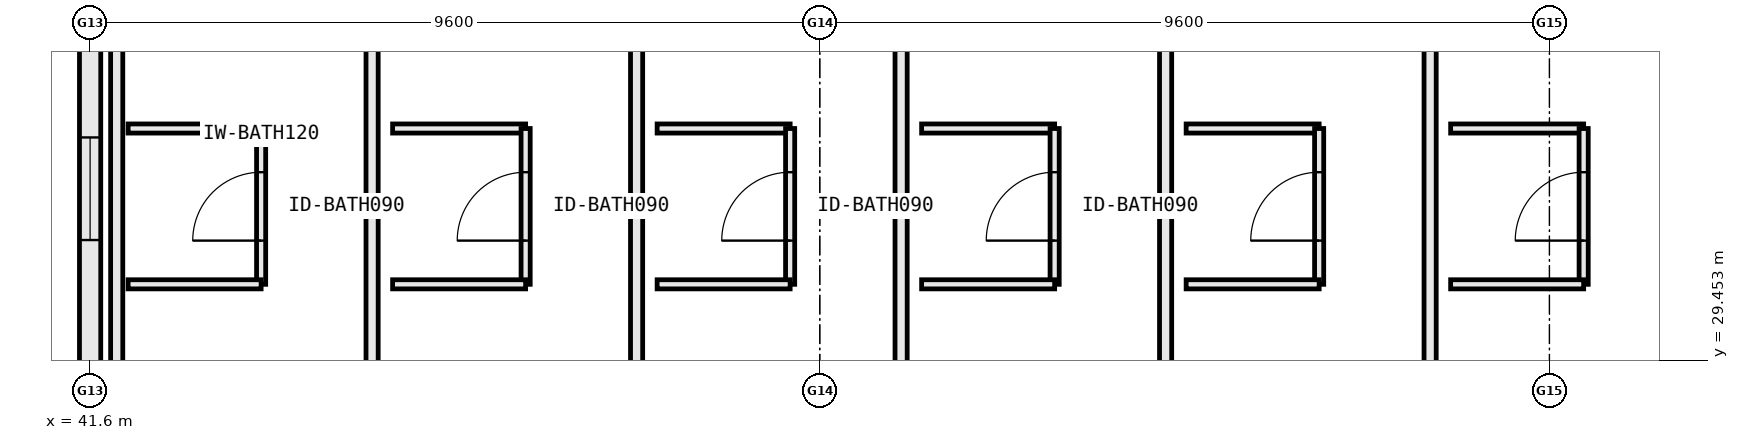
"""IFC4 building model, lengths in metres.
Left out: names, types, materials, properties, quantities, classifications, styles, units other than length and angle.
Written with IfcOpenShell. Run it as: python <this file> out.ifc"""

import sys

from ifc_helpers import new_model, si_unit, direction, frame, frame_2d, origin, place, context, subcontext, project, spatial, rectangle, extrude, element, fill, save


model = new_model("IFC4")
c1 = context("Model", 3, precision=1e-05, world=origin(), true_north=direction((0.0, 1.0)))
c2 = subcontext(c1, "Body", "Model", "MODEL_VIEW")
j1 = project(units=[si_unit("LENGTHUNIT", "METRE"), si_unit("PLANEANGLEUNIT", "RADIAN")], contexts=[c1])
p1 = place(None, origin())
s1 = spatial("IfcSite", under=j1, at=p1, CompositionType="ELEMENT")
p2 = place(p1, origin())
s2 = spatial("IfcBuilding", under=s1, at=p2, CompositionType="ELEMENT")
p3 = place(p2, frame((0.0, 0.0, 31.4)))
s3 = spatial("IfcBuildingStorey", under=s2, at=p3, CompositionType="ELEMENT", Elevation=31.4)
p4 = place(p3, frame((41.6, 36.192, 0.0), z_axis=(0.0, 0.0, 1.0), x_axis=(0.0, -1.0, 0.0)))
e1 = element("IfcWall", 1, at=p4, inside=s3, PredefinedType="STANDARD", context=c2, shape_type="SweptSolid", body=[
    extrude(rectangle(XDim=8.969, YDim=0.28, at=frame_2d((4.484, 0.0))), origin(), (0.0, 0.0, 1.0), 2.93),
])
p5 = place(p4, frame((3.81, 0.0, 0.85)))
e2 = element("IfcOpeningElement", 2, at=p5, cuts=e1, PredefinedType="OPENING", context=c2, shape_type="SweptSolid", body=[
    extrude(rectangle(XDim=1.35, YDim=1.65, at=frame_2d((0.675, 0.825))), frame((0.0, 0.152, 0.0), z_axis=(0.0, -1.0, 0.0), x_axis=(1.0, 0.0, 0.0)), (0.0, 0.0, 1.0), 0.304),
])
p6 = place(p3, frame((41.95, 27.16, 0.0), z_axis=(0.0, 0.0, 1.0), x_axis=(0.0, 1.0, 0.0)))
e3 = element("IfcWall", 3, at=p6, inside=s3, PredefinedType="PARTITIONING", context=c2, shape_type="SweptSolid", body=[
    extrude(rectangle(XDim=10.34, YDim=0.16, at=frame_2d((5.17, 0.0))), origin(), (0.0, 0.0, 1.0), 2.91),
])
p7 = place(p3, frame((45.31, 27.16, 0.0), z_axis=(0.0, 0.0, 1.0), x_axis=(0.0, 1.0, 0.0)))
e4 = element("IfcWall", 4, at=p7, inside=s3, PredefinedType="PARTITIONING", context=c2, shape_type="SweptSolid", body=[
    extrude(rectangle(XDim=10.34, YDim=0.16, at=frame_2d((5.17, 0.0))), origin(), (0.0, 0.0, 1.0), 3.555),
])
p8 = place(p3, frame((42.1, 32.5, 0.0), z_axis=(0.0, 0.0, 1.0), x_axis=(1.0, 0.0, 0.0)))
e5 = element("IfcWall", 5, at=p8, inside=s3, PredefinedType="PARTITIONING", context=c2, shape_type="SweptSolid", body=[
    extrude(rectangle(XDim=1.75, YDim=0.12, at=frame_2d((0.875, 0.0))), origin(), (0.0, 0.0, 1.0), 3.555),
])
p9 = place(p3, frame((43.85, 30.45, 0.0), z_axis=(0.0, 0.0, 1.0), x_axis=(0.0, 1.0, 0.0)))
e6 = element("IfcWall", 6, at=p9, inside=s3, PredefinedType="PARTITIONING", context=c2, shape_type="SweptSolid", body=[
    extrude(rectangle(XDim=2.05, YDim=0.12, at=frame_2d((1.025, 0.0))), origin(), (0.0, 0.0, 1.0), 3.1),
])
p10 = place(p9, frame((0.575, 0.0, 0.0)))
e7 = element("IfcOpeningElement", 7, at=p10, cuts=e6, PredefinedType="OPENING", context=c2, shape_type="SweptSolid", body=[
    extrude(rectangle(XDim=0.9, YDim=2.15, at=frame_2d((0.45, 1.075))), frame((0.0, 0.072, 0.0), z_axis=(0.0, -1.0, 0.0), x_axis=(1.0, 0.0, 0.0)), (0.0, 0.0, 1.0), 0.144),
])
p11 = place(p3, frame((42.1, 30.45, 0.0), z_axis=(0.0, 0.0, 1.0), x_axis=(1.0, 0.0, 0.0)))
e8 = element("IfcWall", 8, at=p11, inside=s3, PredefinedType="PARTITIONING", context=c2, shape_type="SweptSolid", body=[
    extrude(rectangle(XDim=1.75, YDim=0.12, at=frame_2d((0.875, 0.0))), origin(), (0.0, 0.0, 1.0), 3.555),
])
p12 = place(p3, frame((48.79, 27.16, 0.0), z_axis=(0.0, 0.0, 1.0), x_axis=(0.0, 1.0, 0.0)))
e9 = element("IfcWall", 9, at=p12, inside=s3, PredefinedType="PARTITIONING", context=c2, shape_type="SweptSolid", body=[
    extrude(rectangle(XDim=10.34, YDim=0.16, at=frame_2d((5.17, 0.0))), origin(), (0.0, 0.0, 1.0), 3.1),
])
p13 = place(p3, frame((45.58, 32.5, 0.0), z_axis=(0.0, 0.0, 1.0), x_axis=(1.0, 0.0, 0.0)))
e10 = element("IfcWall", 10, at=p13, inside=s3, PredefinedType="PARTITIONING", context=c2, shape_type="SweptSolid", body=[
    extrude(rectangle(XDim=1.75, YDim=0.12, at=frame_2d((0.875, 0.0))), origin(), (0.0, 0.0, 1.0), 3.555),
])
p14 = place(p3, frame((47.33, 30.45, 0.0), z_axis=(0.0, 0.0, 1.0), x_axis=(0.0, 1.0, 0.0)))
e11 = element("IfcWall", 11, at=p14, inside=s3, PredefinedType="PARTITIONING", context=c2, shape_type="SweptSolid", body=[
    extrude(rectangle(XDim=2.05, YDim=0.12, at=frame_2d((1.025, 0.0))), origin(), (0.0, 0.0, 1.0), 3.555),
])
p15 = place(p14, frame((0.575, 0.0, 0.0)))
e12 = element("IfcOpeningElement", 12, at=p15, cuts=e11, PredefinedType="OPENING", context=c2, shape_type="SweptSolid", body=[
    extrude(rectangle(XDim=0.9, YDim=2.15, at=frame_2d((0.45, 1.075))), frame((0.0, 0.072, 0.0), z_axis=(0.0, -1.0, 0.0), x_axis=(1.0, 0.0, 0.0)), (0.0, 0.0, 1.0), 0.144),
])
p16 = place(p3, frame((45.58, 30.45, 0.0), z_axis=(0.0, 0.0, 1.0), x_axis=(1.0, 0.0, 0.0)))
e13 = element("IfcWall", 13, at=p16, inside=s3, PredefinedType="PARTITIONING", context=c2, shape_type="SweptSolid", body=[
    extrude(rectangle(XDim=1.75, YDim=0.12, at=frame_2d((0.875, 0.0))), origin(), (0.0, 0.0, 1.0), 3.555),
])
p17 = place(p3, frame((52.27, 27.16, 0.0), z_axis=(0.0, 0.0, 1.0), x_axis=(0.0, 1.0, 0.0)))
e14 = element("IfcWall", 14, at=p17, inside=s3, PredefinedType="PARTITIONING", context=c2, shape_type="SweptSolid", body=[
    extrude(rectangle(XDim=10.34, YDim=0.16, at=frame_2d((5.17, 0.0))), origin(), (0.0, 0.0, 1.0), 3.555),
])
p18 = place(p3, frame((49.06, 32.5, 0.0), z_axis=(0.0, 0.0, 1.0), x_axis=(1.0, 0.0, 0.0)))
e15 = element("IfcWall", 15, at=p18, inside=s3, PredefinedType="PARTITIONING", context=c2, shape_type="SweptSolid", body=[
    extrude(rectangle(XDim=1.75, YDim=0.12, at=frame_2d((0.875, 0.0))), origin(), (0.0, 0.0, 1.0), 3.555),
])
p19 = place(p3, frame((50.81, 30.45, 0.0), z_axis=(0.0, 0.0, 1.0), x_axis=(0.0, 1.0, 0.0)))
e16 = element("IfcWall", 16, at=p19, inside=s3, PredefinedType="PARTITIONING", context=c2, shape_type="SweptSolid", body=[
    extrude(rectangle(XDim=2.05, YDim=0.12, at=frame_2d((1.025, 0.0))), origin(), (0.0, 0.0, 1.0), 2.93),
])
p20 = place(p19, frame((0.575, 0.0, 0.0)))
e17 = element("IfcOpeningElement", 17, at=p20, cuts=e16, PredefinedType="OPENING", context=c2, shape_type="SweptSolid", body=[
    extrude(rectangle(XDim=0.9, YDim=2.15, at=frame_2d((0.45, 1.075))), frame((0.0, 0.072, 0.0), z_axis=(0.0, -1.0, 0.0), x_axis=(1.0, 0.0, 0.0)), (0.0, 0.0, 1.0), 0.144),
])
p21 = place(p3, frame((49.06, 30.45, 0.0), z_axis=(0.0, 0.0, 1.0), x_axis=(1.0, 0.0, 0.0)))
e18 = element("IfcWall", 18, at=p21, inside=s3, PredefinedType="PARTITIONING", context=c2, shape_type="SweptSolid", body=[
    extrude(rectangle(XDim=1.75, YDim=0.12, at=frame_2d((0.875, 0.0))), origin(), (0.0, 0.0, 1.0), 3.555),
])
p22 = place(p3, frame((55.75, 27.16, 0.0), z_axis=(0.0, 0.0, 1.0), x_axis=(0.0, 1.0, 0.0)))
e19 = element("IfcWall", 19, at=p22, inside=s3, PredefinedType="PARTITIONING", context=c2, shape_type="SweptSolid", body=[
    extrude(rectangle(XDim=10.34, YDim=0.16, at=frame_2d((5.17, 0.0))), origin(), (0.0, 0.0, 1.0), 3.555),
])
p23 = place(p3, frame((52.54, 32.5, 0.0), z_axis=(0.0, 0.0, 1.0), x_axis=(1.0, 0.0, 0.0)))
e20 = element("IfcWall", 20, at=p23, inside=s3, PredefinedType="PARTITIONING", context=c2, shape_type="SweptSolid", body=[
    extrude(rectangle(XDim=1.75, YDim=0.12, at=frame_2d((0.875, 0.0))), origin(), (0.0, 0.0, 1.0), 3.555),
])
p24 = place(p3, frame((54.29, 30.45, 0.0), z_axis=(0.0, 0.0, 1.0), x_axis=(0.0, 1.0, 0.0)))
e21 = element("IfcWall", 21, at=p24, inside=s3, PredefinedType="PARTITIONING", context=c2, shape_type="SweptSolid", body=[
    extrude(rectangle(XDim=2.05, YDim=0.12, at=frame_2d((1.025, 0.0))), origin(), (0.0, 0.0, 1.0), 3.1),
])
p25 = place(p24, frame((0.575, 0.0, 0.0)))
e22 = element("IfcOpeningElement", 22, at=p25, cuts=e21, PredefinedType="OPENING", context=c2, shape_type="SweptSolid", body=[
    extrude(rectangle(XDim=0.9, YDim=2.15, at=frame_2d((0.45, 1.075))), frame((0.0, 0.072, 0.0), z_axis=(0.0, -1.0, 0.0), x_axis=(1.0, 0.0, 0.0)), (0.0, 0.0, 1.0), 0.144),
])
p26 = place(p3, frame((52.54, 30.45, 0.0), z_axis=(0.0, 0.0, 1.0), x_axis=(1.0, 0.0, 0.0)))
e23 = element("IfcWall", 23, at=p26, inside=s3, PredefinedType="PARTITIONING", context=c2, shape_type="SweptSolid", body=[
    extrude(rectangle(XDim=1.75, YDim=0.12, at=frame_2d((0.875, 0.0))), origin(), (0.0, 0.0, 1.0), 3.555),
])
p27 = place(p3, frame((59.23, 27.16, 0.0), z_axis=(0.0, 0.0, 1.0), x_axis=(0.0, 1.0, 0.0)))
e24 = element("IfcWall", 24, at=p27, inside=s3, PredefinedType="PARTITIONING", context=c2, shape_type="SweptSolid", body=[
    extrude(rectangle(XDim=10.34, YDim=0.16, at=frame_2d((5.17, 0.0))), origin(), (0.0, 0.0, 1.0), 3.555),
])
p28 = place(p3, frame((56.02, 32.5, 0.0), z_axis=(0.0, 0.0, 1.0), x_axis=(1.0, 0.0, 0.0)))
e25 = element("IfcWall", 25, at=p28, inside=s3, PredefinedType="PARTITIONING", context=c2, shape_type="SweptSolid", body=[
    extrude(rectangle(XDim=1.75, YDim=0.12, at=frame_2d((0.875, 0.0))), origin(), (0.0, 0.0, 1.0), 3.555),
])
p29 = place(p3, frame((57.77, 30.45, 0.0), z_axis=(0.0, 0.0, 1.0), x_axis=(0.0, 1.0, 0.0)))
e26 = element("IfcWall", 26, at=p29, inside=s3, PredefinedType="PARTITIONING", context=c2, shape_type="SweptSolid", body=[
    extrude(rectangle(XDim=2.05, YDim=0.12, at=frame_2d((1.025, 0.0))), origin(), (0.0, 0.0, 1.0), 3.1),
])
p30 = place(p29, frame((0.575, 0.0, 0.0)))
e27 = element("IfcOpeningElement", 27, at=p30, cuts=e26, PredefinedType="OPENING", context=c2, shape_type="SweptSolid", body=[
    extrude(rectangle(XDim=0.9, YDim=2.15, at=frame_2d((0.45, 1.075))), frame((0.0, 0.072, 0.0), z_axis=(0.0, -1.0, 0.0), x_axis=(1.0, 0.0, 0.0)), (0.0, 0.0, 1.0), 0.144),
])
for number, where, z_axis, x_axis in (
    (28, (56.02, 30.45, 0.0), (0.0, 0.0, 1.0), (1.0, 0.0, 0.0)),
    (29, (59.5, 32.5, 0.0), (0.0, 0.0, 1.0), (1.0, 0.0, 0.0)),
):
    element("IfcWall", number, at=place(p3, frame(where, z_axis=z_axis, x_axis=x_axis)), inside=s3, PredefinedType="PARTITIONING", context=c2, shape_type="SweptSolid", body=[
        extrude(rectangle(XDim=1.75, YDim=0.12, at=frame_2d((0.875, 0.0))), origin(), (0.0, 0.0, 1.0), 3.555),
    ])
p31 = place(p3, frame((61.25, 30.45, 0.0), z_axis=(0.0, 0.0, 1.0), x_axis=(0.0, 1.0, 0.0)))
e30 = element("IfcWall", 30, at=p31, inside=s3, PredefinedType="PARTITIONING", context=c2, shape_type="SweptSolid", body=[
    extrude(rectangle(XDim=2.05, YDim=0.12, at=frame_2d((1.025, 0.0))), origin(), (0.0, 0.0, 1.0), 3.555),
])
p32 = place(p31, frame((0.575, 0.0, 0.0)))
e31 = element("IfcOpeningElement", 31, at=p32, cuts=e30, PredefinedType="OPENING", context=c2, shape_type="SweptSolid", body=[
    extrude(rectangle(XDim=0.9, YDim=2.15, at=frame_2d((0.45, 1.075))), frame((0.0, 0.072, 0.0), z_axis=(0.0, -1.0, 0.0), x_axis=(1.0, 0.0, 0.0)), (0.0, 0.0, 1.0), 0.144),
])
p33 = place(p3, frame((59.5, 30.45, 0.0), z_axis=(0.0, 0.0, 1.0), x_axis=(1.0, 0.0, 0.0)))
e32 = element("IfcWall", 32, at=p33, inside=s3, PredefinedType="PARTITIONING", context=c2, shape_type="SweptSolid", body=[
    extrude(rectangle(XDim=1.75, YDim=0.12, at=frame_2d((0.875, 0.0))), origin(), (0.0, 0.0, 1.0), 3.555),
])
p34 = place(p5, origin())
e33 = element("IfcWindow", 33, at=p34, inside=s3, PartitioningType="SINGLE_PANEL", PredefinedType="WINDOW", context=c2, shape_type="SweptSolid", body=[
    extrude(rectangle(XDim=1.35, YDim=1.65, at=frame_2d((0.675, 0.825))), frame((0.0, 0.03, 0.0), z_axis=(0.0, -1.0, 0.0), x_axis=(1.0, 0.0, 0.0)), (0.0, 0.0, 1.0), 0.06),
])
fill(e2, e33)
p35 = place(p10, origin())
e34 = element("IfcDoor", 34, at=p35, inside=s3, OperationType="SINGLE_SWING_LEFT", PredefinedType="DOOR", context=c2, shape_type="SweptSolid", body=[
    extrude(rectangle(XDim=0.9, YDim=2.15, at=frame_2d((0.45, 1.075))), frame((0.0, 0.025, 0.0), z_axis=(0.0, -1.0, 0.0), x_axis=(1.0, 0.0, 0.0)), (0.0, 0.0, 1.0), 0.05),
])
fill(e7, e34)
p36 = place(p15, origin())
e35 = element("IfcDoor", 35, at=p36, inside=s3, OperationType="SINGLE_SWING_LEFT", PredefinedType="DOOR", context=c2, shape_type="SweptSolid", body=[
    extrude(rectangle(XDim=0.9, YDim=2.15, at=frame_2d((0.45, 1.075))), frame((0.0, 0.025, 0.0), z_axis=(0.0, -1.0, 0.0), x_axis=(1.0, 0.0, 0.0)), (0.0, 0.0, 1.0), 0.05),
])
fill(e12, e35)
p37 = place(p20, origin())
e36 = element("IfcDoor", 36, at=p37, inside=s3, OperationType="SINGLE_SWING_LEFT", PredefinedType="DOOR", context=c2, shape_type="SweptSolid", body=[
    extrude(rectangle(XDim=0.9, YDim=2.15, at=frame_2d((0.45, 1.075))), frame((0.0, 0.025, 0.0), z_axis=(0.0, -1.0, 0.0), x_axis=(1.0, 0.0, 0.0)), (0.0, 0.0, 1.0), 0.05),
])
fill(e17, e36)
p38 = place(p25, origin())
e37 = element("IfcDoor", 37, at=p38, inside=s3, OperationType="SINGLE_SWING_LEFT", PredefinedType="DOOR", context=c2, shape_type="SweptSolid", body=[
    extrude(rectangle(XDim=0.9, YDim=2.15, at=frame_2d((0.45, 1.075))), frame((0.0, 0.025, 0.0), z_axis=(0.0, -1.0, 0.0), x_axis=(1.0, 0.0, 0.0)), (0.0, 0.0, 1.0), 0.05),
])
fill(e22, e37)
p39 = place(p30, origin())
e38 = element("IfcDoor", 38, at=p39, inside=s3, OperationType="SINGLE_SWING_LEFT", PredefinedType="DOOR", context=c2, shape_type="SweptSolid", body=[
    extrude(rectangle(XDim=0.9, YDim=2.15, at=frame_2d((0.45, 1.075))), frame((0.0, 0.025, 0.0), z_axis=(0.0, -1.0, 0.0), x_axis=(1.0, 0.0, 0.0)), (0.0, 0.0, 1.0), 0.05),
])
fill(e27, e38)
p40 = place(p32, origin())
e39 = element("IfcDoor", 39, at=p40, inside=s3, OperationType="SINGLE_SWING_LEFT", PredefinedType="DOOR", context=c2, shape_type="SweptSolid", body=[
    extrude(rectangle(XDim=0.9, YDim=2.15, at=frame_2d((0.45, 1.075))), frame((0.0, 0.025, 0.0), z_axis=(0.0, -1.0, 0.0), x_axis=(1.0, 0.0, 0.0)), (0.0, 0.0, 1.0), 0.05),
])
fill(e31, e39)
save(model, sys.argv[1])
